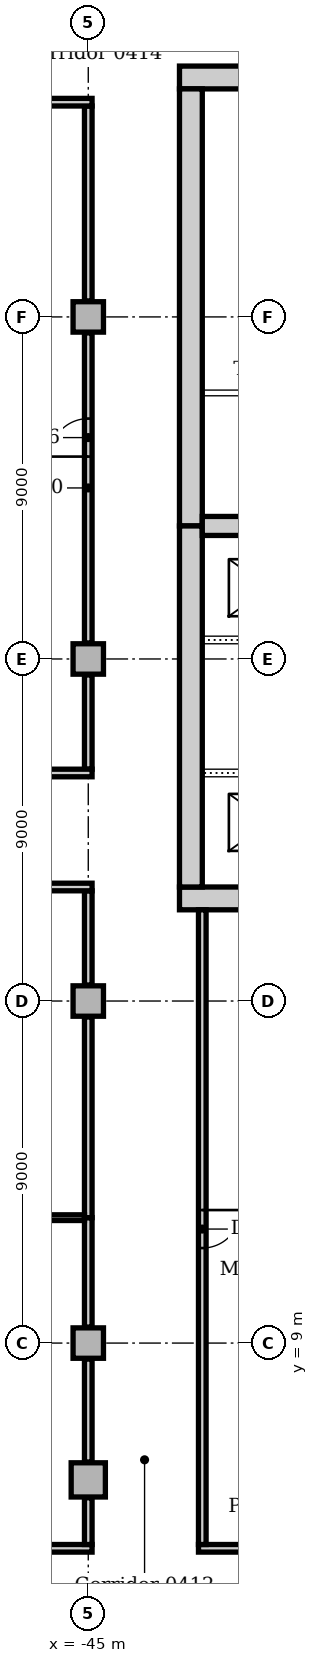
"""IFC4 building model, lengths in metres.
Left out: names, types, materials, properties, quantities, classifications, styles, units other than length and angle.
Written with IfcOpenShell. Run it as: python <this file> out.ifc"""

import sys

from ifc_helpers import new_model, si_unit, direction, frame, frame_2d, origin, origin_2d, place, context, subcontext, project, spatial, rectangle, extrude, element, fill, save


model = new_model("IFC4")
c1 = context("Model", 3, precision=1e-05, world=origin(), true_north=direction((0.0, 1.0)))
c2 = subcontext(c1, "Body", "Model", "MODEL_VIEW")
j1 = project(units=[si_unit("LENGTHUNIT", "METRE"), si_unit("PLANEANGLEUNIT", "RADIAN")], contexts=[c1])
p1 = place(None, origin())
s1 = spatial("IfcSite", under=j1, at=p1, CompositionType="ELEMENT")
p2 = place(p1, origin())
s2 = spatial("IfcBuilding", under=s1, at=p2, CompositionType="ELEMENT")
p3 = place(p2, frame((0.0, 0.0, 21.0)))
s3 = spatial("IfcBuildingStorey", under=s2, at=p3, CompositionType="ELEMENT", Elevation=21.0)
for number, where, z_axis, x_axis in (
    (1, (-42.6, 20.7, 0.0), (0.0, 0.0, 1.0), (1.0, 0.0, 0.0)),
    (2, (-30.9, 42.3, 0.0), (0.0, 0.0, 1.0), (-1.0, 0.0, 0.0)),
):
    element("IfcWall", number, at=place(p3, frame(where, z_axis=z_axis, x_axis=x_axis)), inside=s3, PredefinedType="SOLIDWALL", context=c2, shape_type="SweptSolid", body=[
        extrude(rectangle(XDim=11.7, YDim=0.6, at=frame_2d((5.85, 0.0))), origin(), (0.0, 0.0, 1.0), 5.0),
    ])
p4 = place(p3, frame((-42.3, 42.0, 0.0), z_axis=(0.0, 0.0, 1.0), x_axis=(0.0, -1.0, 0.0)))
e3 = element("IfcWall", 3, at=p4, inside=s3, PredefinedType="SOLIDWALL", context=c2, shape_type="SweptSolid", body=[
    extrude(rectangle(XDim=11.5, YDim=0.6, at=frame_2d((5.75, 0.0))), origin(), (0.0, 0.0, 1.0), 5.0),
])
p5 = place(p4, frame((8.85, 0.0, 0.0)))
e4 = element("IfcOpeningElement", 4, at=p5, cuts=e3, PredefinedType="OPENING", context=c2, shape_type="SweptSolid", body=[
    extrude(rectangle(XDim=1.8, YDim=2.1, at=frame_2d((0.9, 1.05))), frame((0.0, 0.31, 0.0), z_axis=(0.0, -1.0, 0.0), x_axis=(1.0, 0.0, 0.0)), (0.0, 0.0, 1.0), 0.62),
])
p6 = place(p3, frame((-42.3, 30.5, 0.0), z_axis=(0.0, 0.0, 1.0), x_axis=(0.0, -1.0, 0.0)))
e5 = element("IfcWall", 5, at=p6, inside=s3, PredefinedType="SOLIDWALL", context=c2, shape_type="SweptSolid", body=[
    extrude(rectangle(XDim=9.5, YDim=0.6, at=frame_2d((4.75, 0.0))), origin(), (0.0, 0.0, 1.0), 5.0),
])
p7 = place(p6, frame((3.85, 0.0, 0.0)))
e6 = element("IfcOpeningElement", 6, at=p7, cuts=e5, PredefinedType="OPENING", context=c2, shape_type="SweptSolid", body=[
    extrude(rectangle(XDim=1.8, YDim=2.1, at=frame_2d((0.9, 1.05))), frame((0.0, 0.31, 0.0), z_axis=(0.0, -1.0, 0.0), x_axis=(1.0, 0.0, 0.0)), (0.0, 0.0, 1.0), 0.62),
])
p8 = place(p3, frame((-42.0, 30.5, 0.0), z_axis=(0.0, 0.0, 1.0), x_axis=(1.0, 0.0, 0.0)))
e7 = element("IfcWall", 7, at=p8, inside=s3, PredefinedType="SOLIDWALL", context=c2, shape_type="SweptSolid", body=[
    extrude(rectangle(XDim=10.5, YDim=0.5, at=frame_2d((5.25, 0.0))), origin(), (0.0, 0.0, 1.0), 5.0),
])
p9 = place(p3, frame((-45.0, 5.4, 0.0), z_axis=(0.0, 0.0, 1.0), x_axis=(1.0, 0.0, 0.0)))
e8 = element("IfcColumn", 8, at=p9, inside=s3, PredefinedType="COLUMN", context=c2, shape_type="SweptSolid", body=[
    extrude(rectangle(XDim=0.9, YDim=0.9, at=origin_2d()), origin(), (0.0, 0.0, 1.0), 4.85),
])
for number, where, z_axis, x_axis in (
    (9, (-45.0, 9.0, 0.0), (0.0, 0.0, 1.0), (1.0, 0.0, 0.0)),
    (10, (-45.0, 18.0, 0.0), (0.0, 0.0, 1.0), (1.0, 0.0, 0.0)),
    (11, (-45.0, 27.0, 0.0), (0.0, 0.0, 1.0), (1.0, 0.0, 0.0)),
    (12, (-45.0, 36.0, 0.0), (0.0, 0.0, 1.0), (1.0, 0.0, 0.0)),
):
    element("IfcColumn", number, at=place(p3, frame(where, z_axis=z_axis, x_axis=x_axis)), inside=s3, PredefinedType="COLUMN", context=c2, shape_type="SweptSolid", body=[
        extrude(rectangle(XDim=0.8, YDim=0.8, at=origin_2d()), origin(), (0.0, 0.0, 1.0), 4.85),
    ])
p10 = place(p3, frame((-42.1, 3.6, 0.0), z_axis=(0.0, 0.0, 1.0), x_axis=(1.0, 0.0, 0.0)))
e13 = element("IfcWall", 13, at=p10, inside=s3, PredefinedType="PARTITIONING", context=c2, shape_type="SweptSolid", body=[
    extrude(rectangle(XDim=6.1, YDim=0.2, at=frame_2d((3.05, 0.0))), origin(), (0.0, 0.0, 1.0), 4.7),
])
p11 = place(p3, frame((-58.0, 3.6, 0.0), z_axis=(0.0, 0.0, 1.0), x_axis=(1.0, 0.0, 0.0)))
e14 = element("IfcWall", 14, at=p11, inside=s3, PredefinedType="PARTITIONING", context=c2, shape_type="SweptSolid", body=[
    extrude(rectangle(XDim=13.1, YDim=0.2, at=frame_2d((6.55, 0.0))), origin(), (0.0, 0.0, 1.0), 4.7),
])
p12 = place(p11, frame((6.0, 0.0, 0.0)))
e15 = element("IfcOpeningElement", 15, at=p12, cuts=e14, PredefinedType="OPENING", context=c2, shape_type="SweptSolid", body=[
    extrude(rectangle(XDim=1.0, YDim=2.1, at=frame_2d((0.5, 1.05))), frame((0.0, 0.11, 0.0), z_axis=(0.0, -1.0, 0.0), x_axis=(1.0, 0.0, 0.0)), (0.0, 0.0, 1.0), 0.22),
])
p13 = place(p3, frame((-42.0, 3.7, 0.0), z_axis=(0.0, 0.0, 1.0), x_axis=(0.0, 1.0, 0.0)))
e16 = element("IfcWall", 16, at=p13, inside=s3, PredefinedType="PARTITIONING", context=c2, shape_type="SweptSolid", body=[
    extrude(rectangle(XDim=16.7, YDim=0.2, at=frame_2d((8.35, 0.0))), origin(), (0.0, 0.0, 1.0), 4.7),
])
p14 = place(p13, frame((7.8, 0.0, 0.0)))
e17 = element("IfcOpeningElement", 17, at=p14, cuts=e16, PredefinedType="OPENING", context=c2, shape_type="SweptSolid", body=[
    extrude(rectangle(XDim=1.0, YDim=2.1, at=frame_2d((0.5, 1.05))), frame((0.0, 0.11, 0.0), z_axis=(0.0, -1.0, 0.0), x_axis=(1.0, 0.0, 0.0)), (0.0, 0.0, 1.0), 0.22),
])
p15 = place(p3, frame((-45.0, 24.1, 0.0), z_axis=(0.0, 0.0, 1.0), x_axis=(0.0, 1.0, 0.0)))
e18 = element("IfcWall", 18, at=p15, inside=s3, PredefinedType="PARTITIONING", context=c2, shape_type="SweptSolid", body=[
    extrude(rectangle(XDim=2.48, YDim=0.2, at=frame_2d((1.24, 0.0))), origin(), (0.0, 0.0, 1.0), 4.158),
])
p16 = place(p3, frame((-45.0, 27.42, 0.0), z_axis=(0.0, 0.0, 1.0), x_axis=(0.0, 1.0, 0.0)))
e19 = element("IfcWall", 19, at=p16, inside=s3, PredefinedType="PARTITIONING", context=c2, shape_type="SweptSolid", body=[
    extrude(rectangle(XDim=8.16, YDim=0.2, at=frame_2d((4.08, 0.0))), origin(), (0.0, 0.0, 1.0), 4.158),
])
p17 = place(p16, frame((4.905, 0.0, 0.0)))
e20 = element("IfcOpeningElement", 20, at=p17, cuts=e19, PredefinedType="OPENING", context=c2, shape_type="SweptSolid", body=[
    extrude(rectangle(XDim=1.0, YDim=2.1, at=frame_2d((0.5, 1.05))), frame((0.0, 0.11, 0.0), z_axis=(0.0, -1.0, 0.0), x_axis=(1.0, 0.0, 0.0)), (0.0, 0.0, 1.0), 0.22),
])
p18 = place(p3, frame((-45.0, 36.42, 0.0), z_axis=(0.0, 0.0, 1.0), x_axis=(0.0, 1.0, 0.0)))
e21 = element("IfcWall", 21, at=p18, inside=s3, PredefinedType="PARTITIONING", context=c2, shape_type="SweptSolid", body=[
    extrude(rectangle(XDim=5.13, YDim=0.2, at=frame_2d((2.565, 0.0))), origin(), (0.0, 0.0, 1.0), 4.158),
])
p19 = place(p3, frame((-45.0, 3.7, 0.0), z_axis=(0.0, 0.0, 1.0), x_axis=(0.0, 1.0, 0.0)))
e22 = element("IfcWall", 22, at=p19, inside=s3, PredefinedType="PARTITIONING", context=c2, shape_type="SweptSolid", body=[
    extrude(rectangle(XDim=1.23, YDim=0.2, at=frame_2d((0.615, 0.0))), origin(), (0.0, 0.0, 1.0), 4.7),
])
p20 = place(p3, frame((-45.0, 5.87, 0.0), z_axis=(0.0, 0.0, 1.0), x_axis=(0.0, 1.0, 0.0)))
e23 = element("IfcWall", 23, at=p20, inside=s3, PredefinedType="PARTITIONING", context=c2, shape_type="SweptSolid", body=[
    extrude(rectangle(XDim=2.71, YDim=0.2, at=frame_2d((1.355, 0.0))), origin(), (0.0, 0.0, 1.0), 4.85),
])
p21 = place(p3, frame((-45.0, 9.42, 0.0), z_axis=(0.0, 0.0, 1.0), x_axis=(0.0, 1.0, 0.0)))
e24 = element("IfcWall", 24, at=p21, inside=s3, PredefinedType="PARTITIONING", context=c2, shape_type="SweptSolid", body=[
    extrude(rectangle(XDim=2.88, YDim=0.2, at=frame_2d((1.44, 0.0))), origin(), (0.0, 0.0, 1.0), 4.158),
])
p22 = place(p3, frame((-45.0, 12.3, 0.0), z_axis=(0.0, 0.0, 1.0), x_axis=(0.0, 1.0, 0.0)))
e25 = element("IfcWall", 25, at=p22, inside=s3, PredefinedType="PARTITIONING", context=c2, shape_type="SweptSolid", body=[
    extrude(rectangle(XDim=5.28, YDim=0.2, at=frame_2d((2.64, 0.0))), origin(), (0.0, 0.0, 1.0), 4.158),
])
p23 = place(p3, frame((-45.0, 18.42, 0.0), z_axis=(0.0, 0.0, 1.0), x_axis=(0.0, 1.0, 0.0)))
e26 = element("IfcWall", 26, at=p23, inside=s3, PredefinedType="PARTITIONING", context=c2, shape_type="SweptSolid", body=[
    extrude(rectangle(XDim=2.48, YDim=0.2, at=frame_2d((1.24, 0.0))), origin(), (0.0, 0.0, 1.0), 4.158),
])
p24 = place(p3, frame((-52.5, 24.0, 0.0), z_axis=(0.0, 0.0, 1.0), x_axis=(1.0, 0.0, 0.0)))
e27 = element("IfcWall", 27, at=p24, inside=s3, PredefinedType="PARTITIONING", context=c2, shape_type="SweptSolid", body=[
    extrude(rectangle(XDim=7.6, YDim=0.2, at=frame_2d((3.8, 0.0))), origin(), (0.0, 0.0, 1.0), 4.85),
])
p25 = place(p3, frame((-58.0, 21.0, 0.0), z_axis=(0.0, 0.0, 1.0), x_axis=(1.0, 0.0, 0.0)))
e28 = element("IfcWall", 28, at=p25, inside=s3, PredefinedType="PARTITIONING", context=c2, shape_type="SweptSolid", body=[
    extrude(rectangle(XDim=13.1, YDim=0.2, at=frame_2d((6.55, 0.0))), origin(), (0.0, 0.0, 1.0), 4.85),
])
p26 = place(p25, frame((6.0, 0.0, 0.0)))
e29 = element("IfcOpeningElement", 29, at=p26, cuts=e28, PredefinedType="OPENING", context=c2, shape_type="SweptSolid", body=[
    extrude(rectangle(XDim=1.0, YDim=2.1, at=frame_2d((0.5, 1.05))), frame((0.0, 0.11, 0.0), z_axis=(0.0, -1.0, 0.0), x_axis=(1.0, 0.0, 0.0)), (0.0, 0.0, 1.0), 0.22),
])
p27 = place(p3, frame((-52.5, 41.65, 0.0), z_axis=(0.0, 0.0, 1.0), x_axis=(1.0, 0.0, 0.0)))
e30 = element("IfcWall", 30, at=p27, inside=s3, PredefinedType="PARTITIONING", context=c2, shape_type="SweptSolid", body=[
    extrude(rectangle(XDim=7.6, YDim=0.2, at=frame_2d((3.8, 0.0))), origin(), (0.0, 0.0, 1.0), 4.85),
])
p28 = place(p3, frame((-58.0, 12.3, 0.0), z_axis=(0.0, 0.0, 1.0), x_axis=(1.0, 0.0, 0.0)))
e31 = element("IfcWall", 31, at=p28, inside=s3, PredefinedType="PARTITIONING", context=c2, shape_type="SweptSolid", body=[
    extrude(rectangle(XDim=12.9, YDim=0.15, at=frame_2d((6.45, 0.0))), origin(), (0.0, 0.0, 1.0), 4.85),
])
p29 = place(p3, frame((-38.6, 24.0, 0.0), z_axis=(0.0, 0.0, 1.0), x_axis=(-1.0, 0.0, 0.0)))
e32 = element("IfcWall", 32, at=p29, inside=s3, PredefinedType="SOLIDWALL", context=c2, shape_type="SweptSolid", body=[
    extrude(rectangle(XDim=3.4, YDim=0.2, at=frame_2d((1.7, 0.0))), origin(), (0.0, 0.0, 1.0), 5.0),
])
p30 = place(p29, frame((0.8, 0.0, 0.0)))
e33 = element("IfcOpeningElement", 33, at=p30, cuts=e32, PredefinedType="OPENING", context=c2, shape_type="SweptSolid", body=[
    extrude(rectangle(XDim=1.1, YDim=2.1, at=frame_2d((0.55, 1.05))), frame((0.0, 0.11, 0.0), z_axis=(0.0, -1.0, 0.0), x_axis=(1.0, 0.0, 0.0)), (0.0, 0.0, 1.0), 0.22),
])
p31 = place(p3, frame((-42.0, 27.5, 0.0), z_axis=(0.0, 0.0, 1.0), x_axis=(1.0, 0.0, 0.0)))
e34 = element("IfcWall", 34, at=p31, inside=s3, PredefinedType="SOLIDWALL", context=c2, shape_type="SweptSolid", body=[
    extrude(rectangle(XDim=3.4, YDim=0.2, at=frame_2d((1.7, 0.0))), origin(), (0.0, 0.0, 1.0), 5.0),
])
p32 = place(p31, frame((1.5, 0.0, 0.0)))
e35 = element("IfcOpeningElement", 35, at=p32, cuts=e34, PredefinedType="OPENING", context=c2, shape_type="SweptSolid", body=[
    extrude(rectangle(XDim=1.1, YDim=2.1, at=frame_2d((0.55, 1.05))), frame((0.0, 0.11, 0.0), z_axis=(0.0, -1.0, 0.0), x_axis=(1.0, 0.0, 0.0)), (0.0, 0.0, 1.0), 0.22),
])
p33 = place(p3, frame((-37.425, 34.0, 0.0), z_axis=(0.0, 0.0, 1.0), x_axis=(-1.0, 0.0, 0.0)))
e36 = element("IfcWall", 36, at=p33, inside=s3, PredefinedType="PARTITIONING", context=c2, shape_type="SweptSolid", body=[
    extrude(rectangle(XDim=4.575, YDim=0.15, at=frame_2d((2.288, 0.0))), origin(), (0.0, 0.0, 1.0), 4.85),
])
p34 = place(p33, frame((1.925, 0.0, 0.0)))
e37 = element("IfcOpeningElement", 37, at=p34, cuts=e36, PredefinedType="OPENING", context=c2, shape_type="SweptSolid", body=[
    extrude(rectangle(XDim=0.8, YDim=2.1, at=frame_2d((0.4, 1.05))), frame((0.0, 0.085, 0.0), z_axis=(0.0, -1.0, 0.0), x_axis=(1.0, 0.0, 0.0)), (0.0, 0.0, 1.0), 0.17),
])
p35 = place(p14, frame((1.0, 0.0, 0.0), z_axis=(0.0, 0.0, 1.0), x_axis=(-1.0, 0.0, 0.0)))
e38 = element("IfcDoor", 38, at=p35, inside=s3, OperationType="SINGLE_SWING_LEFT", PredefinedType="DOOR", context=c2, shape_type="SweptSolid", body=[
    extrude(rectangle(XDim=1.0, YDim=2.1, at=frame_2d((0.5, 1.05))), frame((0.0, 0.025, 0.0), z_axis=(0.0, -1.0, 0.0), x_axis=(1.0, 0.0, 0.0)), (0.0, 0.0, 1.0), 0.05),
])
fill(e17, e38)
p36 = place(p17, origin())
e39 = element("IfcDoor", 39, at=p36, inside=s3, OperationType="SINGLE_SWING_LEFT", PredefinedType="DOOR", context=c2, shape_type="SweptSolid", body=[
    extrude(rectangle(XDim=1.0, YDim=2.1, at=frame_2d((0.5, 1.05))), frame((0.0, 0.025, 0.0), z_axis=(0.0, -1.0, 0.0), x_axis=(1.0, 0.0, 0.0)), (0.0, 0.0, 1.0), 0.05),
])
fill(e20, e39)
p37 = place(p7, origin())
e40 = element("IfcDoor", 40, at=p37, inside=s3, OperationType="DOUBLE_DOOR_SINGLE_SWING", PredefinedType="DOOR", context=c2, shape_type="SweptSolid", body=[
    extrude(rectangle(XDim=1.8, YDim=2.1, at=frame_2d((0.9, 1.05))), frame((0.0, 0.025, 0.0), z_axis=(0.0, -1.0, 0.0), x_axis=(1.0, 0.0, 0.0)), (0.0, 0.0, 1.0), 0.05),
])
fill(e6, e40)
p38 = place(p5, frame((1.8, 0.0, 0.0), z_axis=(0.0, 0.0, 1.0), x_axis=(-1.0, 0.0, 0.0)))
e41 = element("IfcDoor", 41, at=p38, inside=s3, OperationType="DOUBLE_DOOR_SINGLE_SWING", PredefinedType="DOOR", context=c2, shape_type="SweptSolid", body=[
    extrude(rectangle(XDim=1.8, YDim=2.1, at=frame_2d((0.9, 1.05))), frame((0.0, 0.025, 0.0), z_axis=(0.0, -1.0, 0.0), x_axis=(1.0, 0.0, 0.0)), (0.0, 0.0, 1.0), 0.05),
])
fill(e4, e41)
save(model, sys.argv[1])
